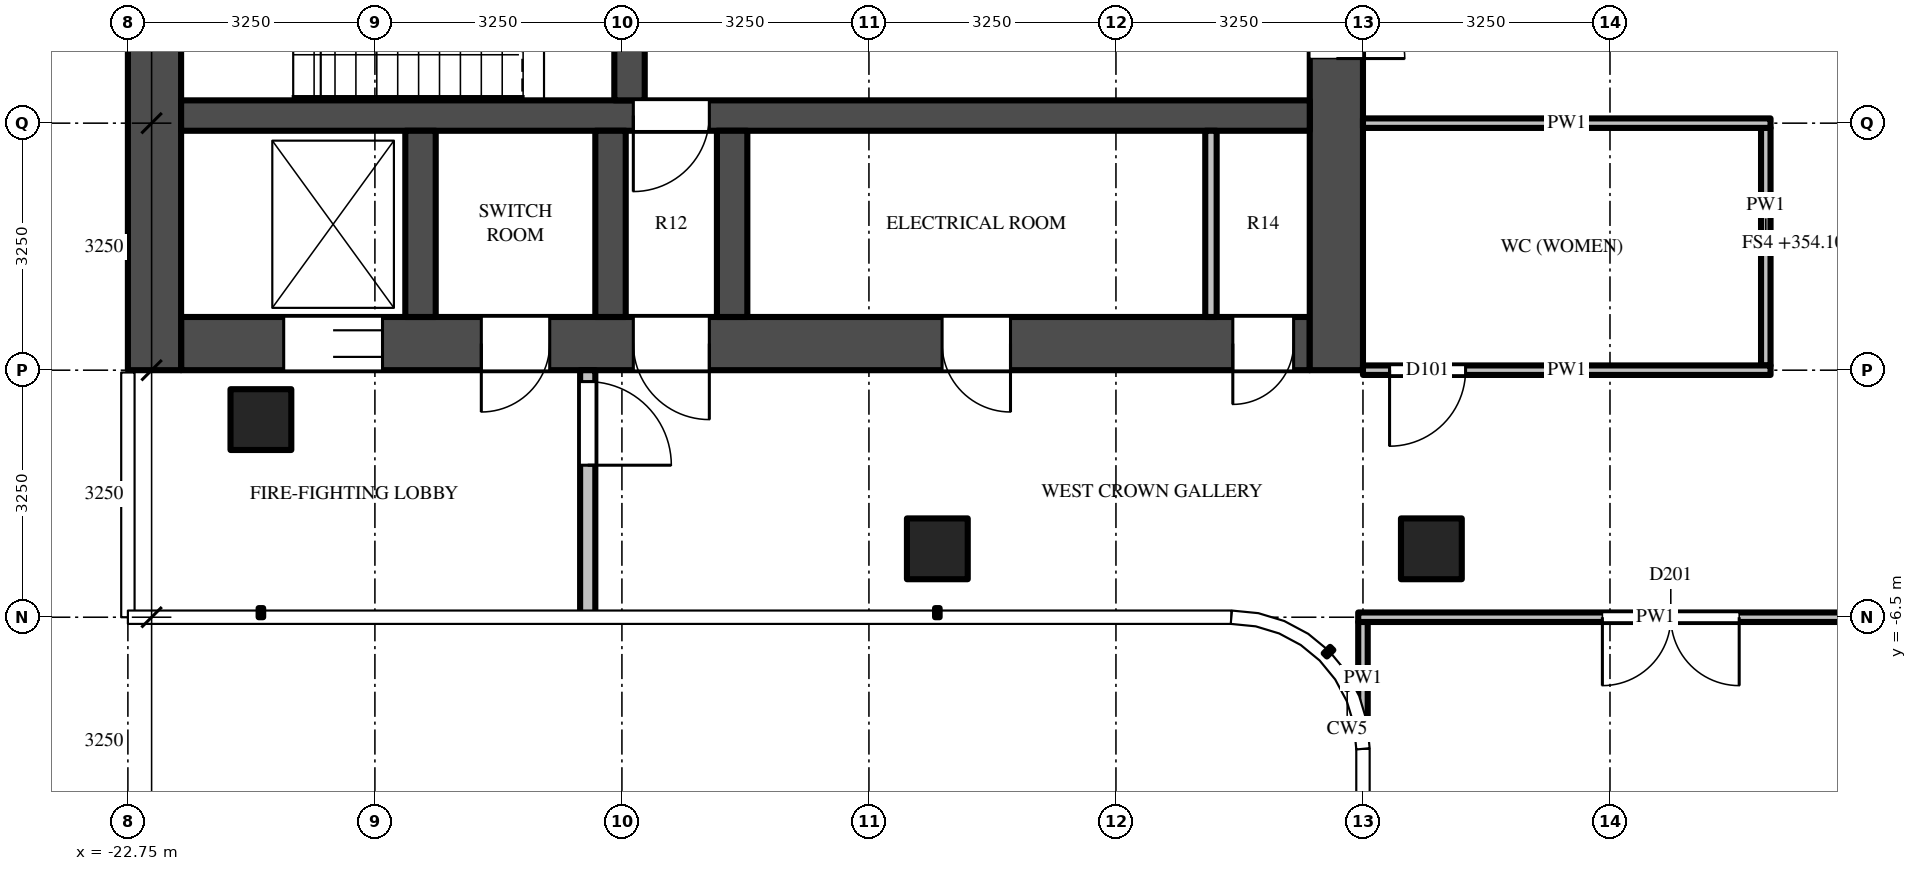
"""IFC4 building model, lengths in metres.
Left out: names, types, materials, properties, quantities, classifications, styles, units other than length and angle.
Written with IfcOpenShell. Run it as: python <this file> out.ifc"""

import sys

from ifc_helpers import new_model, si_unit, direction, frame, frame_2d, origin, origin_2d, place, context, subcontext, project, spatial, rectangle, extrude, source, transform, mapped, element, fill, save


model = new_model("IFC4")
c1 = context("Model", 3, precision=1e-05, world=origin(), true_north=direction((0.0, 1.0)))
c2 = subcontext(c1, "Body", "Model", "MODEL_VIEW")
j1 = project(units=[si_unit("LENGTHUNIT", "METRE"), si_unit("PLANEANGLEUNIT", "RADIAN")], contexts=[c1])
p1 = place(None, origin())
s1 = spatial("IfcSite", under=j1, at=p1, CompositionType="ELEMENT")
p2 = place(p1, origin())
s2 = spatial("IfcBuilding", under=s1, at=p2, CompositionType="ELEMENT")
p3 = place(p2, frame((0.0, 0.0, 354.1)))
s3 = spatial("IfcBuildingStorey", under=s2, at=p3, CompositionType="ELEMENT", Elevation=354.1)
m1 = source(origin(), c2, "Body", "SweptSolid", [
    extrude(rectangle(XDim=0.8, YDim=0.8, at=origin_2d()), origin(), (0.0, 0.0, 1.0), 4.0),
])
for number, where, z_axis, x_axis in (
    (1, (-5.6, -5.6, 0.0), (0.0, 0.0, 1.0), (1.0, 0.0, 0.0)),
    (2, (-12.1, -5.6, 0.0), (0.0, 0.0, 1.0), (1.0, 0.0, 0.0)),
    (3, (-21.0, -3.9, 0.0), (0.0, 0.0, 1.0), (1.0, 0.0, 0.0)),
):
    element("IfcColumn", number, at=place(p3, frame(where, z_axis=z_axis, x_axis=x_axis)), inside=s3, PredefinedType="COLUMN", context=c2, shape_type="MappedRepresentation", body=[
        mapped(m1, transform((0.0, 0.0, 0.0))),
    ])
m2 = source(origin(), c2, "Body", "SweptSolid", [
    extrude(rectangle(XDim=14.85, YDim=0.7, at=frame_2d((7.425, 0.0))), origin(), (0.0, 0.0, 1.0), 3.75),
])
p4 = place(p3, frame((-7.2, -2.9, 0.0), z_axis=(0.0, 0.0, 1.0), x_axis=(-1.0, 0.0, 0.0)))
e4 = element("IfcWall", 4, at=p4, inside=s3, PredefinedType="SHEAR", context=c2, shape_type="MappedRepresentation", body=[
    mapped(m2, transform((0.0, 0.0, 0.0))),
])
m3 = source(origin(), c2, "Body", "SweptSolid", [
    extrude(rectangle(XDim=1.3, YDim=2.1, at=frame_2d((0.65, 1.05))), frame((0.0, 0.36, 0.0), z_axis=(0.0, -1.0, 0.0), x_axis=(1.0, 0.0, 0.0)), (0.0, 0.0, 1.0), 0.72),
])
p5 = place(p4, frame((12.2, 0.0, 0.0)))
e5 = element("IfcOpeningElement", 5, at=p5, cuts=e4, PredefinedType="OPENING", context=c2, shape_type="MappedRepresentation", body=[
    mapped(m3, transform((0.0, 0.0, 0.0))),
])
m4 = source(origin(), c2, "Body", "SweptSolid", [
    extrude(rectangle(XDim=1.0, YDim=2.1, at=frame_2d((0.5, 1.05))), frame((0.0, 0.36, 0.0), z_axis=(0.0, -1.0, 0.0), x_axis=(1.0, 0.0, 0.0)), (0.0, 0.0, 1.0), 0.72),
])
p6 = place(p4, frame((7.9, 0.0, 0.0)))
e6 = element("IfcOpeningElement", 6, at=p6, cuts=e4, PredefinedType="OPENING", context=c2, shape_type="MappedRepresentation", body=[
    mapped(m4, transform((0.0, 0.0, 0.0))),
])
m5 = source(origin(), c2, "Body", "SweptSolid", [
    extrude(rectangle(XDim=0.8, YDim=2.1, at=frame_2d((0.4, 1.05))), frame((0.0, 0.36, 0.0), z_axis=(0.0, -1.0, 0.0), x_axis=(1.0, 0.0, 0.0)), (0.0, 0.0, 1.0), 0.72),
])
p7 = place(p4, frame((0.212, 0.0, 0.0)))
e7 = element("IfcOpeningElement", 7, at=p7, cuts=e4, PredefinedType="OPENING", context=c2, shape_type="MappedRepresentation", body=[
    mapped(m5, transform((0.0, 0.0, 0.0))),
])
m6 = source(origin(), c2, "Body", "SweptSolid", [
    extrude(rectangle(XDim=0.9, YDim=2.1, at=frame_2d((0.45, 1.05))), frame((0.0, 0.36, 0.0), z_axis=(0.0, -1.0, 0.0), x_axis=(1.0, 0.0, 0.0)), (0.0, 0.0, 1.0), 0.72),
])
p8 = place(p4, frame((3.938, 0.0, 0.0)))
e8 = element("IfcOpeningElement", 8, at=p8, cuts=e4, PredefinedType="OPENING", context=c2, shape_type="MappedRepresentation", body=[
    mapped(m6, transform((0.0, 0.0, 0.0))),
])
p9 = place(p4, frame((10.0, 0.0, 0.0)))
e9 = element("IfcOpeningElement", 9, at=p9, cuts=e4, PredefinedType="OPENING", context=c2, shape_type="MappedRepresentation", body=[
    mapped(m6, transform((0.0, 0.0, 0.0))),
])
m7 = source(origin(), c2, "Body", "SweptSolid", [
    extrude(rectangle(XDim=9.05, YDim=0.7, at=frame_2d((4.525, 0.0))), origin(), (0.0, 0.0, 1.0), 3.75),
])
p10 = place(p3, frame((-6.85, 5.8, 0.0), z_axis=(0.0, 0.0, 1.0), x_axis=(0.0, -1.0, 0.0)))
e10 = element("IfcWall", 10, at=p10, inside=s3, PredefinedType="SHEAR", context=c2, shape_type="MappedRepresentation", body=[
    mapped(m7, transform((0.0, 0.0, 0.0))),
])
m8 = source(origin(), c2, "Body", "SweptSolid", [
    extrude(rectangle(XDim=1.8, YDim=2.1, at=frame_2d((0.9, 1.05))), frame((0.0, 0.36, 0.0), z_axis=(0.0, -1.0, 0.0), x_axis=(1.0, 0.0, 0.0)), (0.0, 0.0, 1.0), 0.72),
])
p11 = place(p10, frame((3.15, 0.0, 0.0)))
e11 = element("IfcOpeningElement", 11, at=p11, cuts=e10, PredefinedType="OPENING", context=c2, shape_type="MappedRepresentation", body=[
    mapped(m8, transform((0.0, 0.0, 0.0))),
])
p12 = place(p3, frame((-22.4, 5.8, 0.0), z_axis=(0.0, 0.0, 1.0), x_axis=(0.0, -1.0, 0.0)))
e12 = element("IfcWall", 12, at=p12, inside=s3, PredefinedType="SHEAR", context=c2, shape_type="MappedRepresentation", body=[
    mapped(m7, transform((0.0, 0.0, 0.0))),
])
m9 = source(origin(), c2, "Body", "SweptSolid", [
    extrude(rectangle(XDim=14.85, YDim=0.4, at=frame_2d((7.425, 0.0))), origin(), (0.0, 0.0, 1.0), 3.75),
])
p13 = place(p3, frame((-7.2, 0.1, 0.0), z_axis=(0.0, 0.0, 1.0), x_axis=(-1.0, 0.0, 0.0)))
e13 = element("IfcWall", 13, at=p13, inside=s3, PredefinedType="SHEAR", context=c2, shape_type="MappedRepresentation", body=[
    mapped(m9, transform((0.0, 0.0, 0.0))),
])
m10 = source(origin(), c2, "Body", "SweptSolid", [
    extrude(rectangle(XDim=1.0, YDim=2.1, at=frame_2d((0.5, 1.05))), frame((0.0, 0.21, 0.0), z_axis=(0.0, -1.0, 0.0), x_axis=(1.0, 0.0, 0.0)), (0.0, 0.0, 1.0), 0.42),
])
p14 = place(p13, frame((7.9, 0.0, 0.0)))
e14 = element("IfcOpeningElement", 14, at=p14, cuts=e13, PredefinedType="OPENING", context=c2, shape_type="MappedRepresentation", body=[
    mapped(m10, transform((0.0, 0.0, 0.0))),
])
m11 = source(origin(), c2, "Body", "SweptSolid", [
    extrude(rectangle(XDim=5.5, YDim=0.4, at=frame_2d((2.75, 0.0))), origin(), (0.0, 0.0, 1.0), 3.75),
])
p15 = place(p3, frame((-16.15, 5.8, 0.0), z_axis=(0.0, 0.0, 1.0), x_axis=(0.0, -1.0, 0.0)))
e15 = element("IfcWall", 15, at=p15, inside=s3, PredefinedType="SHEAR", context=c2, shape_type="MappedRepresentation", body=[
    mapped(m11, transform((0.0, 0.0, 0.0))),
])
m12 = source(origin(), c2, "Body", "SweptSolid", [
    extrude(rectangle(XDim=1.1, YDim=2.1, at=frame_2d((0.55, 1.05))), frame((0.0, 0.21, 0.0), z_axis=(0.0, -1.0, 0.0), x_axis=(1.0, 0.0, 0.0)), (0.0, 0.0, 1.0), 0.42),
])
p16 = place(p15, frame((0.725, 0.0, 0.0)))
e16 = element("IfcOpeningElement", 16, at=p16, cuts=e15, PredefinedType="OPENING", context=c2, shape_type="MappedRepresentation", body=[
    mapped(m12, transform((0.0, 0.0, 0.0))),
])
p17 = place(p15, frame((3.675, 0.0, 0.0)))
e17 = element("IfcOpeningElement", 17, at=p17, cuts=e15, PredefinedType="OPENING", context=c2, shape_type="MappedRepresentation", body=[
    mapped(m12, transform((0.0, 0.0, 0.0))),
])
m13 = source(origin(), c2, "Body", "SweptSolid", [
    extrude(rectangle(XDim=2.45, YDim=0.4, at=frame_2d((1.225, 0.0))), origin(), (0.0, 0.0, 1.0), 3.75),
])
for number, where, z_axis, x_axis in (
    (18, (-14.8, -0.1, 0.0), (0.0, 0.0, 1.0), (0.0, -1.0, 0.0)),
    (19, (-16.4, -0.1, 0.0), (0.0, 0.0, 1.0), (0.0, -1.0, 0.0)),
    (20, (-18.9, -0.1, 0.0), (0.0, 0.0, 1.0), (0.0, -1.0, 0.0)),
):
    element("IfcWall", number, at=place(p3, frame(where, z_axis=z_axis, x_axis=x_axis)), inside=s3, PredefinedType="SHEAR", context=c2, shape_type="MappedRepresentation", body=[
        mapped(m13, transform((0.0, 0.0, 0.0))),
    ])
m14 = source(origin(), c2, "Body", "SweptSolid", [
    extrude(rectangle(XDim=3.25, YDim=0.2, at=frame_2d((1.625, 0.0))), origin(), (0.0, 0.0, 1.0), 3.75),
])
p18 = place(p3, frame((-16.7, -3.25, 0.0), z_axis=(0.0, 0.0, 1.0), x_axis=(0.0, -1.0, 0.0)))
e21 = element("IfcWall", 21, at=p18, inside=s3, PredefinedType="PARTITIONING", context=c2, shape_type="MappedRepresentation", body=[
    mapped(m14, transform((0.0, 0.0, 0.0))),
])
m15 = source(origin(), c2, "Body", "SweptSolid", [
    extrude(rectangle(XDim=1.1, YDim=2.1, at=frame_2d((0.55, 1.05))), frame((0.0, 0.11, 0.0), z_axis=(0.0, -1.0, 0.0), x_axis=(1.0, 0.0, 0.0)), (0.0, 0.0, 1.0), 0.22),
])
p19 = place(p18, frame((0.15, 0.0, 0.0)))
e22 = element("IfcOpeningElement", 22, at=p19, cuts=e21, PredefinedType="OPENING", context=c2, shape_type="MappedRepresentation", body=[
    mapped(m15, transform((0.0, 0.0, 0.0))),
])
m16 = source(origin(), c2, "Body", "SweptSolid", [
    extrude(rectangle(XDim=2.45, YDim=0.15, at=frame_2d((1.225, 0.0))), origin(), (0.0, 0.0, 1.0), 3.75),
])
p20 = place(p3, frame((-8.5, -0.1, 0.0), z_axis=(0.0, 0.0, 1.0), x_axis=(0.0, -1.0, 0.0)))
e23 = element("IfcWall", 23, at=p20, inside=s3, PredefinedType="PARTITIONING", context=c2, shape_type="MappedRepresentation", body=[
    mapped(m16, transform((0.0, 0.0, 0.0))),
])
m17 = source(origin(), c2, "Body", "SweptSolid", [
    extrude(rectangle(XDim=1.469, YDim=0.125, at=frame_2d((0.734, 0.0))), origin(), (0.0, 0.0, 1.0), 3.75),
])
p21 = place(p3, frame((-6.5, -6.562, 0.0), z_axis=(0.0, 0.0, 1.0), x_axis=(0.0, -1.0, 0.0)))
e24 = element("IfcWall", 24, at=p21, inside=s3, PredefinedType="PARTITIONING", context=c2, shape_type="MappedRepresentation", body=[
    mapped(m17, transform((0.0, 0.0, 0.0))),
])
m18 = source(origin(), c2, "Body", "SweptSolid", [
    extrude(rectangle(XDim=3.125, YDim=0.125, at=frame_2d((1.562, 0.0))), origin(), (0.0, 0.0, 1.0), 3.118),
])
p22 = place(p3, frame((-1.2, -0.062, 0.0), z_axis=(0.0, 0.0, 1.0), x_axis=(0.0, -1.0, 0.0)))
e25 = element("IfcWall", 25, at=p22, inside=s3, PredefinedType="PARTITIONING", context=c2, shape_type="MappedRepresentation", body=[
    mapped(m18, transform((0.0, 0.0, 0.0))),
])
m19 = source(origin(), c2, "Body", "SweptSolid", [
    extrude(rectangle(XDim=7.825, YDim=0.125, at=frame_2d((3.913, 0.0))), origin(), (0.0, 0.0, 1.0), 2.83),
])
p23 = place(p3, frame((1.262, -6.5, 0.0), z_axis=(0.0, 0.0, 1.0), x_axis=(-1.0, 0.0, 0.0)))
e26 = element("IfcWall", 26, at=p23, inside=s3, PredefinedType="PARTITIONING", context=c2, shape_type="MappedRepresentation", body=[
    mapped(m19, transform((0.0, 0.0, 0.0))),
])
m20 = source(origin(), c2, "Body", "SweptSolid", [
    extrude(rectangle(XDim=1.8, YDim=2.1, at=frame_2d((0.9, 1.05))), frame((0.0, 0.073, 0.0), z_axis=(0.0, -1.0, 0.0), x_axis=(1.0, 0.0, 0.0)), (0.0, 0.0, 1.0), 0.145),
])
p24 = place(p23, frame((2.812, 0.0, 0.0)))
e27 = element("IfcOpeningElement", 27, at=p24, cuts=e26, PredefinedType="OPENING", context=c2, shape_type="MappedRepresentation", body=[
    mapped(m20, transform((0.0, 0.0, 0.0))),
])
m21 = source(origin(), c2, "Body", "SweptSolid", [
    extrude(rectangle(XDim=5.363, YDim=0.125, at=frame_2d((2.681, 0.0))), origin(), (0.0, 0.0, 1.0), 3.046),
])
p25 = place(p3, frame((-1.137, -3.25, 0.0), z_axis=(0.0, 0.0, 1.0), x_axis=(-1.0, 0.0, 0.0)))
e28 = element("IfcWall", 28, at=p25, inside=s3, PredefinedType="PARTITIONING", context=c2, shape_type="MappedRepresentation", body=[
    mapped(m21, transform((0.0, 0.0, 0.0))),
])
m22 = source(origin(), c2, "Body", "SweptSolid", [
    extrude(rectangle(XDim=1.0, YDim=2.1, at=frame_2d((0.5, 1.05))), frame((0.0, 0.073, 0.0), z_axis=(0.0, -1.0, 0.0), x_axis=(1.0, 0.0, 0.0)), (0.0, 0.0, 1.0), 0.145),
])
p26 = place(p25, frame((4.012, 0.0, 0.0)))
e29 = element("IfcOpeningElement", 29, at=p26, cuts=e28, PredefinedType="OPENING", context=c2, shape_type="MappedRepresentation", body=[
    mapped(m22, transform((0.0, 0.0, 0.0))),
])
p27 = place(p3, frame((-1.137, 0.0, 0.0), z_axis=(0.0, 0.0, 1.0), x_axis=(-1.0, 0.0, 0.0)))
e30 = element("IfcWall", 30, at=p27, inside=s3, PredefinedType="PARTITIONING", context=c2, shape_type="MappedRepresentation", body=[
    mapped(m21, transform((0.0, 0.0, 0.0))),
])
m23 = source(origin(), c2, "Body", "SweptSolid", [
    extrude(rectangle(XDim=1.3, YDim=2.1, at=frame_2d((0.65, 1.05))), frame((0.0, -0.275, 0.0), z_axis=(0.0, -1.0, 0.0), x_axis=(1.0, 0.0, 0.0)), (0.0, 0.0, 1.0), 0.05),
])
p28 = place(p5, origin())
e31 = element("IfcDoor", 31, at=p28, inside=s3, OperationType="DOUBLE_DOOR_SLIDING", PredefinedType="DOOR", context=c2, shape_type="MappedRepresentation", body=[
    mapped(m23, transform((0.0, 0.0, 0.0))),
])
fill(e5, e31)
m24 = source(origin(), c2, "Body", "SweptSolid", [
    extrude(rectangle(XDim=1.8, YDim=2.1, at=frame_2d((0.9, 1.05))), frame((0.0, -0.275, 0.0), z_axis=(0.0, -1.0, 0.0), x_axis=(1.0, 0.0, 0.0)), (0.0, 0.0, 1.0), 0.05),
])
p29 = place(p11, origin())
e32 = element("IfcDoor", 32, at=p29, inside=s3, OperationType="DOUBLE_DOOR_SINGLE_SWING", PredefinedType="DOOR", context=c2, shape_type="MappedRepresentation", body=[
    mapped(m24, transform((0.0, 0.0, 0.0))),
])
fill(e11, e32)
m25 = source(origin(), c2, "Body", "SweptSolid", [
    extrude(rectangle(XDim=1.0, YDim=2.1, at=frame_2d((0.5, 1.05))), frame((0.0, 0.025, 0.0), z_axis=(0.0, -1.0, 0.0), x_axis=(1.0, 0.0, 0.0)), (0.0, 0.0, 1.0), 0.05),
])
p30 = place(p14, origin())
e33 = element("IfcDoor", 33, at=p30, inside=s3, OperationType="SINGLE_SWING_RIGHT", PredefinedType="DOOR", context=c2, shape_type="MappedRepresentation", body=[
    mapped(m25, transform((0.0, 0.0, 0.0))),
])
fill(e14, e33)
m26 = source(origin(), c2, "Body", "SweptSolid", [
    extrude(rectangle(XDim=1.0, YDim=2.1, at=frame_2d((0.5, 1.05))), frame((0.0, -0.275, 0.0), z_axis=(0.0, -1.0, 0.0), x_axis=(1.0, 0.0, 0.0)), (0.0, 0.0, 1.0), 0.05),
])
p31 = place(p6, origin())
e34 = element("IfcDoor", 34, at=p31, inside=s3, OperationType="SINGLE_SWING_LEFT", PredefinedType="DOOR", context=c2, shape_type="MappedRepresentation", body=[
    mapped(m26, transform((0.0, 0.0, 0.0))),
])
fill(e6, e34)
m27 = source(origin(), c2, "Body", "SweptSolid", [
    extrude(rectangle(XDim=1.1, YDim=2.1, at=frame_2d((0.55, 1.05))), frame((0.0, 0.025, 0.0), z_axis=(0.0, -1.0, 0.0), x_axis=(1.0, 0.0, 0.0)), (0.0, 0.0, 1.0), 0.05),
])
p32 = place(p19, origin())
e35 = element("IfcDoor", 35, at=p32, inside=s3, OperationType="SINGLE_SWING_RIGHT", PredefinedType="DOOR", context=c2, shape_type="MappedRepresentation", body=[
    mapped(m27, transform((0.0, 0.0, 0.0))),
])
fill(e22, e35)
m28 = source(origin(), c2, "Body", "SweptSolid", [
    extrude(rectangle(XDim=0.8, YDim=2.1, at=frame_2d((0.4, 1.05))), frame((0.0, -0.275, 0.0), z_axis=(0.0, -1.0, 0.0), x_axis=(1.0, 0.0, 0.0)), (0.0, 0.0, 1.0), 0.05),
])
p33 = place(p7, origin())
e36 = element("IfcDoor", 36, at=p33, inside=s3, OperationType="SINGLE_SWING_RIGHT", PredefinedType="DOOR", context=c2, shape_type="MappedRepresentation", body=[
    mapped(m28, transform((0.0, 0.0, 0.0))),
])
fill(e7, e36)
m29 = source(origin(), c2, "Body", "SweptSolid", [
    extrude(rectangle(XDim=0.9, YDim=2.1, at=frame_2d((0.45, 1.05))), frame((0.0, -0.275, 0.0), z_axis=(0.0, -1.0, 0.0), x_axis=(1.0, 0.0, 0.0)), (0.0, 0.0, 1.0), 0.05),
])
p34 = place(p8, origin())
e37 = element("IfcDoor", 37, at=p34, inside=s3, OperationType="SINGLE_SWING_LEFT", PredefinedType="DOOR", context=c2, shape_type="MappedRepresentation", body=[
    mapped(m29, transform((0.0, 0.0, 0.0))),
])
fill(e8, e37)
p35 = place(p9, origin())
e38 = element("IfcDoor", 38, at=p35, inside=s3, OperationType="SINGLE_SWING_RIGHT", PredefinedType="DOOR", context=c2, shape_type="MappedRepresentation", body=[
    mapped(m29, transform((0.0, 0.0, 0.0))),
])
fill(e9, e38)
m30 = source(origin(), c2, "Body", "SweptSolid", [
    extrude(rectangle(XDim=1.8, YDim=2.1, at=frame_2d((0.9, 1.05))), frame((0.0, 0.025, 0.0), z_axis=(0.0, -1.0, 0.0), x_axis=(1.0, 0.0, 0.0)), (0.0, 0.0, 1.0), 0.05),
])
p36 = place(p24, origin())
e39 = element("IfcDoor", 39, at=p36, inside=s3, OperationType="DOUBLE_DOOR_SINGLE_SWING", PredefinedType="DOOR", context=c2, shape_type="MappedRepresentation", body=[
    mapped(m30, transform((0.0, 0.0, 0.0))),
])
fill(e27, e39)
p37 = place(p26, origin())
e40 = element("IfcDoor", 40, at=p37, inside=s3, OperationType="SINGLE_SWING_RIGHT", PredefinedType="DOOR", context=c2, shape_type="MappedRepresentation", body=[
    mapped(m25, transform((0.0, 0.0, 0.0))),
])
fill(e29, e40)
save(model, sys.argv[1])
